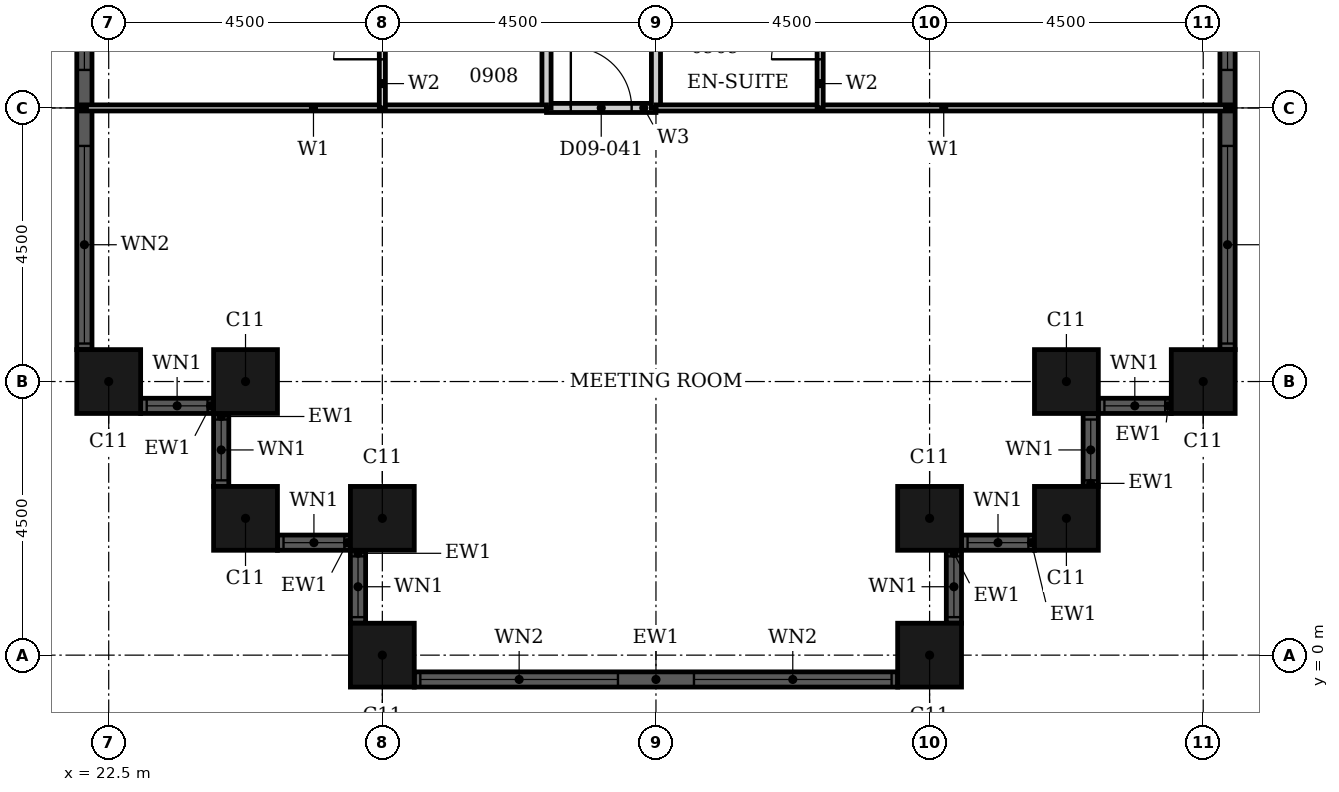
"""IFC4 building model, lengths in metres.
Left out: names, types, materials, properties, quantities, classifications, styles, units other than length and angle.
Written with IfcOpenShell. Run it as: python <this file> out.ifc"""

import sys

from ifc_helpers import new_model, si_unit, direction, frame, frame_2d, origin, origin_2d, place, context, subcontext, project, spatial, rectangle, hollow_rectangle, extrude, element, fill, save


model = new_model("IFC4")
c1 = context("Model", 3, precision=1e-05, world=origin(), true_north=direction((0.0, 1.0)))
c2 = subcontext(c1, "Body", "Model", "MODEL_VIEW")
j1 = project(units=[si_unit("LENGTHUNIT", "METRE"), si_unit("PLANEANGLEUNIT", "RADIAN")], contexts=[c1])
p1 = place(None, origin())
s1 = spatial("IfcSite", under=j1, at=p1, CompositionType="ELEMENT")
p2 = place(p1, origin())
s2 = spatial("IfcBuilding", under=s1, at=p2, CompositionType="ELEMENT")
p3 = place(p2, frame((0.0, 0.0, 44.4)))
s3 = spatial("IfcBuildingStorey", under=s2, at=p3, CompositionType="ELEMENT", Elevation=44.4)
for number, where, z_axis, x_axis in (
    (1, (22.5, 4.5, 0.0), (0.0, 0.0, 1.0), (1.0, 0.0, 0.0)),
    (2, (24.75, 4.5, 0.0), (0.0, 0.0, 1.0), (1.0, 0.0, 0.0)),
    (3, (24.75, 2.25, 0.0), (0.0, 0.0, 1.0), (1.0, 0.0, 0.0)),
    (4, (27.0, 2.25, 0.0), (0.0, 0.0, 1.0), (1.0, 0.0, 0.0)),
    (5, (27.0, 0.0, 0.0), (0.0, 0.0, 1.0), (1.0, 0.0, 0.0)),
    (6, (36.0, 0.0, 0.0), (0.0, 0.0, 1.0), (1.0, 0.0, 0.0)),
    (7, (36.0, 2.25, 0.0), (0.0, 0.0, 1.0), (1.0, 0.0, 0.0)),
    (8, (38.25, 2.25, 0.0), (0.0, 0.0, 1.0), (1.0, 0.0, 0.0)),
    (9, (38.25, 4.5, 0.0), (0.0, 0.0, 1.0), (1.0, 0.0, 0.0)),
    (10, (40.5, 4.5, 0.0), (0.0, 0.0, 1.0), (1.0, 0.0, 0.0)),
):
    element("IfcColumn", number, at=place(p3, frame(where, z_axis=z_axis, x_axis=x_axis)), inside=s3, PredefinedType="COLUMN", context=c2, shape_type="SweptSolid", body=[
        extrude(hollow_rectangle(XDim=1.05, YDim=1.05, WallThickness=0.034, at=origin_2d()), origin(), (0.0, 0.0, 1.0), 3.6),
    ])
p4 = place(p3, frame((23.025, 4.1, 0.0), z_axis=(0.0, 0.0, 1.0), x_axis=(1.0, 0.0, 0.0)))
e11 = element("IfcWall", 11, at=p4, inside=s3, PredefinedType="SOLIDWALL", context=c2, shape_type="SweptSolid", body=[
    extrude(rectangle(XDim=1.2, YDim=0.25, at=frame_2d((0.6, 0.0))), origin(), (0.0, 0.0, 1.0), 3.6),
])
p5 = place(p4, frame((0.1, 0.0, 0.9)))
e12 = element("IfcOpeningElement", 12, at=p5, cuts=e11, PredefinedType="OPENING", context=c2, shape_type="SweptSolid", body=[
    extrude(rectangle(XDim=1.0, YDim=2.08, at=frame_2d((0.5, 1.04))), frame((0.0, 0.135, 0.0), z_axis=(0.0, -1.0, 0.0), x_axis=(1.0, 0.0, 0.0)), (0.0, 0.0, 1.0), 0.27),
])
p6 = place(p3, frame((24.35, 3.975, 0.0), z_axis=(0.0, 0.0, 1.0), x_axis=(0.0, -1.0, 0.0)))
e13 = element("IfcWall", 13, at=p6, inside=s3, PredefinedType="SOLIDWALL", context=c2, shape_type="SweptSolid", body=[
    extrude(rectangle(XDim=1.2, YDim=0.25, at=frame_2d((0.6, 0.0))), origin(), (0.0, 0.0, 1.0), 3.6),
])
p7 = place(p6, frame((0.1, 0.0, 0.9)))
e14 = element("IfcOpeningElement", 14, at=p7, cuts=e13, PredefinedType="OPENING", context=c2, shape_type="SweptSolid", body=[
    extrude(rectangle(XDim=1.0, YDim=2.08, at=frame_2d((0.5, 1.04))), frame((0.0, 0.135, 0.0), z_axis=(0.0, -1.0, 0.0), x_axis=(1.0, 0.0, 0.0)), (0.0, 0.0, 1.0), 0.27),
])
p8 = place(p3, frame((25.275, 1.85, 0.0), z_axis=(0.0, 0.0, 1.0), x_axis=(1.0, 0.0, 0.0)))
e15 = element("IfcWall", 15, at=p8, inside=s3, PredefinedType="SOLIDWALL", context=c2, shape_type="SweptSolid", body=[
    extrude(rectangle(XDim=1.2, YDim=0.25, at=frame_2d((0.6, 0.0))), origin(), (0.0, 0.0, 1.0), 3.6),
])
p9 = place(p8, frame((0.1, 0.0, 0.9)))
e16 = element("IfcOpeningElement", 16, at=p9, cuts=e15, PredefinedType="OPENING", context=c2, shape_type="SweptSolid", body=[
    extrude(rectangle(XDim=1.0, YDim=2.08, at=frame_2d((0.5, 1.04))), frame((0.0, 0.135, 0.0), z_axis=(0.0, -1.0, 0.0), x_axis=(1.0, 0.0, 0.0)), (0.0, 0.0, 1.0), 0.27),
])
p10 = place(p3, frame((26.6, 1.725, 0.0), z_axis=(0.0, 0.0, 1.0), x_axis=(0.0, -1.0, 0.0)))
e17 = element("IfcWall", 17, at=p10, inside=s3, PredefinedType="SOLIDWALL", context=c2, shape_type="SweptSolid", body=[
    extrude(rectangle(XDim=1.2, YDim=0.25, at=frame_2d((0.6, 0.0))), origin(), (0.0, 0.0, 1.0), 3.6),
])
p11 = place(p10, frame((0.1, 0.0, 0.9)))
e18 = element("IfcOpeningElement", 18, at=p11, cuts=e17, PredefinedType="OPENING", context=c2, shape_type="SweptSolid", body=[
    extrude(rectangle(XDim=1.0, YDim=2.08, at=frame_2d((0.5, 1.04))), frame((0.0, 0.135, 0.0), z_axis=(0.0, -1.0, 0.0), x_axis=(1.0, 0.0, 0.0)), (0.0, 0.0, 1.0), 0.27),
])
p12 = place(p3, frame((27.525, -0.4, 0.0), z_axis=(0.0, 0.0, 1.0), x_axis=(1.0, 0.0, 0.0)))
e19 = element("IfcWall", 19, at=p12, inside=s3, PredefinedType="SOLIDWALL", context=c2, shape_type="SweptSolid", body=[
    extrude(rectangle(XDim=7.95, YDim=0.25, at=frame_2d((3.975, 0.0))), origin(), (0.0, 0.0, 1.0), 3.6),
])
p13 = place(p12, frame((0.1, 0.0, 0.9)))
e20 = element("IfcOpeningElement", 20, at=p13, cuts=e19, PredefinedType="OPENING", context=c2, shape_type="SweptSolid", body=[
    extrude(rectangle(XDim=3.25, YDim=2.08, at=frame_2d((1.625, 1.04))), frame((0.0, 0.135, 0.0), z_axis=(0.0, -1.0, 0.0), x_axis=(1.0, 0.0, 0.0)), (0.0, 0.0, 1.0), 0.27),
])
p14 = place(p12, frame((4.6, 0.0, 0.9)))
e21 = element("IfcOpeningElement", 21, at=p14, cuts=e19, PredefinedType="OPENING", context=c2, shape_type="SweptSolid", body=[
    extrude(rectangle(XDim=3.25, YDim=2.08, at=frame_2d((1.625, 1.04))), frame((0.0, 0.135, 0.0), z_axis=(0.0, -1.0, 0.0), x_axis=(1.0, 0.0, 0.0)), (0.0, 0.0, 1.0), 0.27),
])
p15 = place(p3, frame((36.4, 0.525, 0.0), z_axis=(0.0, 0.0, 1.0), x_axis=(0.0, 1.0, 0.0)))
e22 = element("IfcWall", 22, at=p15, inside=s3, PredefinedType="SOLIDWALL", context=c2, shape_type="SweptSolid", body=[
    extrude(rectangle(XDim=1.2, YDim=0.25, at=frame_2d((0.6, 0.0))), origin(), (0.0, 0.0, 1.0), 3.6),
])
p16 = place(p15, frame((0.1, 0.0, 0.9)))
e23 = element("IfcOpeningElement", 23, at=p16, cuts=e22, PredefinedType="OPENING", context=c2, shape_type="SweptSolid", body=[
    extrude(rectangle(XDim=1.0, YDim=2.08, at=frame_2d((0.5, 1.04))), frame((0.0, 0.135, 0.0), z_axis=(0.0, -1.0, 0.0), x_axis=(1.0, 0.0, 0.0)), (0.0, 0.0, 1.0), 0.27),
])
p17 = place(p3, frame((36.525, 1.85, 0.0), z_axis=(0.0, 0.0, 1.0), x_axis=(1.0, 0.0, 0.0)))
e24 = element("IfcWall", 24, at=p17, inside=s3, PredefinedType="SOLIDWALL", context=c2, shape_type="SweptSolid", body=[
    extrude(rectangle(XDim=1.2, YDim=0.25, at=frame_2d((0.6, 0.0))), origin(), (0.0, 0.0, 1.0), 3.6),
])
p18 = place(p17, frame((0.1, 0.0, 0.9)))
e25 = element("IfcOpeningElement", 25, at=p18, cuts=e24, PredefinedType="OPENING", context=c2, shape_type="SweptSolid", body=[
    extrude(rectangle(XDim=1.0, YDim=2.08, at=frame_2d((0.5, 1.04))), frame((0.0, 0.135, 0.0), z_axis=(0.0, -1.0, 0.0), x_axis=(1.0, 0.0, 0.0)), (0.0, 0.0, 1.0), 0.27),
])
p19 = place(p3, frame((38.65, 2.775, 0.0), z_axis=(0.0, 0.0, 1.0), x_axis=(0.0, 1.0, 0.0)))
e26 = element("IfcWall", 26, at=p19, inside=s3, PredefinedType="SOLIDWALL", context=c2, shape_type="SweptSolid", body=[
    extrude(rectangle(XDim=1.2, YDim=0.25, at=frame_2d((0.6, 0.0))), origin(), (0.0, 0.0, 1.0), 3.6),
])
p20 = place(p19, frame((0.1, 0.0, 0.9)))
e27 = element("IfcOpeningElement", 27, at=p20, cuts=e26, PredefinedType="OPENING", context=c2, shape_type="SweptSolid", body=[
    extrude(rectangle(XDim=1.0, YDim=2.08, at=frame_2d((0.5, 1.04))), frame((0.0, 0.135, 0.0), z_axis=(0.0, -1.0, 0.0), x_axis=(1.0, 0.0, 0.0)), (0.0, 0.0, 1.0), 0.27),
])
p21 = place(p3, frame((38.775, 4.1, 0.0), z_axis=(0.0, 0.0, 1.0), x_axis=(1.0, 0.0, 0.0)))
e28 = element("IfcWall", 28, at=p21, inside=s3, PredefinedType="SOLIDWALL", context=c2, shape_type="SweptSolid", body=[
    extrude(rectangle(XDim=1.2, YDim=0.25, at=frame_2d((0.6, 0.0))), origin(), (0.0, 0.0, 1.0), 3.6),
])
p22 = place(p21, frame((0.1, 0.0, 0.9)))
e29 = element("IfcOpeningElement", 29, at=p22, cuts=e28, PredefinedType="OPENING", context=c2, shape_type="SweptSolid", body=[
    extrude(rectangle(XDim=1.0, YDim=2.08, at=frame_2d((0.5, 1.04))), frame((0.0, 0.135, 0.0), z_axis=(0.0, -1.0, 0.0), x_axis=(1.0, 0.0, 0.0)), (0.0, 0.0, 1.0), 0.27),
])
p23 = place(p3, frame((40.9, 5.025, 0.0), z_axis=(0.0, 0.0, 1.0), x_axis=(0.0, 1.0, 0.0)))
e30 = element("IfcWall", 30, at=p23, inside=s3, PredefinedType="SOLIDWALL", context=c2, shape_type="SweptSolid", body=[
    extrude(rectangle(XDim=7.95, YDim=0.25, at=frame_2d((3.975, 0.0))), origin(), (0.0, 0.0, 1.0), 3.6),
])
p24 = place(p23, frame((0.1, 0.0, 0.9)))
e31 = element("IfcOpeningElement", 31, at=p24, cuts=e30, PredefinedType="OPENING", context=c2, shape_type="SweptSolid", body=[
    extrude(rectangle(XDim=3.25, YDim=2.08, at=frame_2d((1.625, 1.04))), frame((0.0, 0.135, 0.0), z_axis=(0.0, -1.0, 0.0), x_axis=(1.0, 0.0, 0.0)), (0.0, 0.0, 1.0), 0.27),
])
p25 = place(p23, frame((4.6, 0.0, 0.9)))
e32 = element("IfcOpeningElement", 32, at=p25, cuts=e30, PredefinedType="OPENING", context=c2, shape_type="SweptSolid", body=[
    extrude(rectangle(XDim=3.25, YDim=2.08, at=frame_2d((1.625, 1.04))), frame((0.0, 0.135, 0.0), z_axis=(0.0, -1.0, 0.0), x_axis=(1.0, 0.0, 0.0)), (0.0, 0.0, 1.0), 0.27),
])
p26 = place(p3, frame((22.1, 12.975, 0.0), z_axis=(0.0, 0.0, 1.0), x_axis=(0.0, -1.0, 0.0)))
e33 = element("IfcWall", 33, at=p26, inside=s3, PredefinedType="SOLIDWALL", context=c2, shape_type="SweptSolid", body=[
    extrude(rectangle(XDim=7.95, YDim=0.25, at=frame_2d((3.975, 0.0))), origin(), (0.0, 0.0, 1.0), 3.6),
])
p27 = place(p26, frame((0.1, 0.0, 0.9)))
e34 = element("IfcOpeningElement", 34, at=p27, cuts=e33, PredefinedType="OPENING", context=c2, shape_type="SweptSolid", body=[
    extrude(rectangle(XDim=3.25, YDim=2.08, at=frame_2d((1.625, 1.04))), frame((0.0, 0.135, 0.0), z_axis=(0.0, -1.0, 0.0), x_axis=(1.0, 0.0, 0.0)), (0.0, 0.0, 1.0), 0.27),
])
p28 = place(p26, frame((4.6, 0.0, 0.9)))
e35 = element("IfcOpeningElement", 35, at=p28, cuts=e33, PredefinedType="OPENING", context=c2, shape_type="SweptSolid", body=[
    extrude(rectangle(XDim=3.25, YDim=2.08, at=frame_2d((1.625, 1.04))), frame((0.0, 0.135, 0.0), z_axis=(0.0, -1.0, 0.0), x_axis=(1.0, 0.0, 0.0)), (0.0, 0.0, 1.0), 0.27),
])
p29 = place(p3, frame((29.7, 9.0, 0.0), z_axis=(0.0, 0.0, 1.0), x_axis=(1.0, 0.0, 0.0)))
e36 = element("IfcWall", 36, at=p29, inside=s3, PredefinedType="PARTITIONING", context=c2, shape_type="SweptSolid", body=[
    extrude(rectangle(XDim=1.8, YDim=0.15, at=frame_2d((0.9, 0.0))), origin(), (0.0, 0.0, 1.0), 3.2),
])
p30 = place(p29, frame((0.4, 0.0, 0.0)))
e37 = element("IfcOpeningElement", 37, at=p30, cuts=e36, PredefinedType="OPENING", context=c2, shape_type="SweptSolid", body=[
    extrude(rectangle(XDim=1.0, YDim=2.1, at=frame_2d((0.5, 1.05))), frame((0.0, 0.085, 0.0), z_axis=(0.0, -1.0, 0.0), x_axis=(1.0, 0.0, 0.0)), (0.0, 0.0, 1.0), 0.17),
])
p31 = place(p3, frame((29.7, 9.0, 0.0), z_axis=(0.0, 0.0, 1.0), x_axis=(0.0, 1.0, 0.0)))
e38 = element("IfcWall", 38, at=p31, inside=s3, PredefinedType="PARTITIONING", context=c2, shape_type="SweptSolid", body=[
    extrude(rectangle(XDim=4.5, YDim=0.15, at=frame_2d((2.25, 0.0))), origin(), (0.0, 0.0, 1.0), 3.2),
])
p32 = place(p31, frame((2.95, 0.0, 0.0)))
e39 = element("IfcOpeningElement", 39, at=p32, cuts=e38, PredefinedType="OPENING", context=c2, shape_type="SweptSolid", body=[
    extrude(rectangle(XDim=1.0, YDim=2.1, at=frame_2d((0.5, 1.05))), frame((0.0, 0.085, 0.0), z_axis=(0.0, -1.0, 0.0), x_axis=(1.0, 0.0, 0.0)), (0.0, 0.0, 1.0), 0.17),
])
p33 = place(p3, frame((31.5, 9.0, 0.0), z_axis=(0.0, 0.0, 1.0), x_axis=(0.0, 1.0, 0.0)))
e40 = element("IfcWall", 40, at=p33, inside=s3, PredefinedType="PARTITIONING", context=c2, shape_type="SweptSolid", body=[
    extrude(rectangle(XDim=11.7, YDim=0.15, at=frame_2d((5.85, 0.0))), origin(), (0.0, 0.0, 1.0), 2.48),
])
p34 = place(p33, frame((2.95, 0.0, 0.0)))
e41 = element("IfcOpeningElement", 41, at=p34, cuts=e40, PredefinedType="OPENING", context=c2, shape_type="SweptSolid", body=[
    extrude(rectangle(XDim=1.0, YDim=2.1, at=frame_2d((0.5, 1.05))), frame((0.0, 0.085, 0.0), z_axis=(0.0, -1.0, 0.0), x_axis=(1.0, 0.0, 0.0)), (0.0, 0.0, 1.0), 0.17),
])
p35 = place(p3, frame((31.5, 9.0, 0.0), z_axis=(0.0, 0.0, 1.0), x_axis=(1.0, 0.0, 0.0)))
e42 = element("IfcWall", 42, at=p35, inside=s3, PredefinedType="PARTITIONING", context=c2, shape_type="SweptSolid", body=[
    extrude(rectangle(XDim=9.465, YDim=0.1, at=frame_2d((4.732, 0.0))), origin(), (0.0, 0.0, 1.0), 3.2),
])
p36 = place(p3, frame((22.035, 9.0, 0.0), z_axis=(0.0, 0.0, 1.0), x_axis=(1.0, 0.0, 0.0)))
e43 = element("IfcWall", 43, at=p36, inside=s3, PredefinedType="PARTITIONING", context=c2, shape_type="SweptSolid", body=[
    extrude(rectangle(XDim=7.665, YDim=0.1, at=frame_2d((3.833, 0.0))), origin(), (0.0, 0.0, 1.0), 3.2),
])
p37 = place(p3, frame((27.0, 9.0, 0.0), z_axis=(0.0, 0.0, 1.0), x_axis=(0.0, 1.0, 0.0)))
e44 = element("IfcWall", 44, at=p37, inside=s3, PredefinedType="PARTITIONING", context=c2, shape_type="SweptSolid", body=[
    extrude(rectangle(XDim=2.4, YDim=0.1, at=frame_2d((1.2, 0.0))), origin(), (0.0, 0.0, 1.0), 2.48),
])
p38 = place(p37, frame((0.8, 0.0, 0.0)))
e45 = element("IfcOpeningElement", 45, at=p38, cuts=e44, PredefinedType="OPENING", context=c2, shape_type="SweptSolid", body=[
    extrude(rectangle(XDim=0.8, YDim=2.1, at=frame_2d((0.4, 1.05))), frame((0.0, 0.06, 0.0), z_axis=(0.0, -1.0, 0.0), x_axis=(1.0, 0.0, 0.0)), (0.0, 0.0, 1.0), 0.12),
])
p39 = place(p3, frame((34.2, 9.0, 0.0), z_axis=(0.0, 0.0, 1.0), x_axis=(0.0, 1.0, 0.0)))
e46 = element("IfcWall", 46, at=p39, inside=s3, PredefinedType="PARTITIONING", context=c2, shape_type="SweptSolid", body=[
    extrude(rectangle(XDim=2.4, YDim=0.1, at=frame_2d((1.2, 0.0))), origin(), (0.0, 0.0, 1.0), 3.2),
])
p40 = place(p39, frame((0.8, 0.0, 0.0)))
e47 = element("IfcOpeningElement", 47, at=p40, cuts=e46, PredefinedType="OPENING", context=c2, shape_type="SweptSolid", body=[
    extrude(rectangle(XDim=0.8, YDim=2.1, at=frame_2d((0.4, 1.05))), frame((0.0, 0.06, 0.0), z_axis=(0.0, -1.0, 0.0), x_axis=(1.0, 0.0, 0.0)), (0.0, 0.0, 1.0), 0.12),
])
p41 = place(p5, origin())
e48 = element("IfcWindow", 48, at=p41, inside=s3, PartitioningType="SINGLE_PANEL", PredefinedType="WINDOW", context=c2, shape_type="SweptSolid", body=[
    extrude(rectangle(XDim=1.0, YDim=2.08, at=frame_2d((0.5, 1.04))), frame((0.0, 0.03, 0.0), z_axis=(0.0, -1.0, 0.0), x_axis=(1.0, 0.0, 0.0)), (0.0, 0.0, 1.0), 0.06),
])
fill(e12, e48)
p42 = place(p7, origin())
e49 = element("IfcWindow", 49, at=p42, inside=s3, PartitioningType="SINGLE_PANEL", PredefinedType="WINDOW", context=c2, shape_type="SweptSolid", body=[
    extrude(rectangle(XDim=1.0, YDim=2.08, at=frame_2d((0.5, 1.04))), frame((0.0, 0.03, 0.0), z_axis=(0.0, -1.0, 0.0), x_axis=(1.0, 0.0, 0.0)), (0.0, 0.0, 1.0), 0.06),
])
fill(e14, e49)
p43 = place(p9, origin())
e50 = element("IfcWindow", 50, at=p43, inside=s3, PartitioningType="SINGLE_PANEL", PredefinedType="WINDOW", context=c2, shape_type="SweptSolid", body=[
    extrude(rectangle(XDim=1.0, YDim=2.08, at=frame_2d((0.5, 1.04))), frame((0.0, 0.03, 0.0), z_axis=(0.0, -1.0, 0.0), x_axis=(1.0, 0.0, 0.0)), (0.0, 0.0, 1.0), 0.06),
])
fill(e16, e50)
p44 = place(p11, origin())
e51 = element("IfcWindow", 51, at=p44, inside=s3, PartitioningType="SINGLE_PANEL", PredefinedType="WINDOW", context=c2, shape_type="SweptSolid", body=[
    extrude(rectangle(XDim=1.0, YDim=2.08, at=frame_2d((0.5, 1.04))), frame((0.0, 0.03, 0.0), z_axis=(0.0, -1.0, 0.0), x_axis=(1.0, 0.0, 0.0)), (0.0, 0.0, 1.0), 0.06),
])
fill(e18, e51)
p45 = place(p13, origin())
e52 = element("IfcWindow", 52, at=p45, inside=s3, PartitioningType="SINGLE_PANEL", PredefinedType="WINDOW", context=c2, shape_type="SweptSolid", body=[
    extrude(rectangle(XDim=3.25, YDim=2.08, at=frame_2d((1.625, 1.04))), frame((0.0, 0.03, 0.0), z_axis=(0.0, -1.0, 0.0), x_axis=(1.0, 0.0, 0.0)), (0.0, 0.0, 1.0), 0.06),
])
fill(e20, e52)
p46 = place(p14, origin())
e53 = element("IfcWindow", 53, at=p46, inside=s3, PartitioningType="SINGLE_PANEL", PredefinedType="WINDOW", context=c2, shape_type="SweptSolid", body=[
    extrude(rectangle(XDim=3.25, YDim=2.08, at=frame_2d((1.625, 1.04))), frame((0.0, 0.03, 0.0), z_axis=(0.0, -1.0, 0.0), x_axis=(1.0, 0.0, 0.0)), (0.0, 0.0, 1.0), 0.06),
])
fill(e21, e53)
p47 = place(p16, origin())
e54 = element("IfcWindow", 54, at=p47, inside=s3, PartitioningType="SINGLE_PANEL", PredefinedType="WINDOW", context=c2, shape_type="SweptSolid", body=[
    extrude(rectangle(XDim=1.0, YDim=2.08, at=frame_2d((0.5, 1.04))), frame((0.0, 0.03, 0.0), z_axis=(0.0, -1.0, 0.0), x_axis=(1.0, 0.0, 0.0)), (0.0, 0.0, 1.0), 0.06),
])
fill(e23, e54)
p48 = place(p18, origin())
e55 = element("IfcWindow", 55, at=p48, inside=s3, PartitioningType="SINGLE_PANEL", PredefinedType="WINDOW", context=c2, shape_type="SweptSolid", body=[
    extrude(rectangle(XDim=1.0, YDim=2.08, at=frame_2d((0.5, 1.04))), frame((0.0, 0.03, 0.0), z_axis=(0.0, -1.0, 0.0), x_axis=(1.0, 0.0, 0.0)), (0.0, 0.0, 1.0), 0.06),
])
fill(e25, e55)
p49 = place(p20, origin())
e56 = element("IfcWindow", 56, at=p49, inside=s3, PartitioningType="SINGLE_PANEL", PredefinedType="WINDOW", context=c2, shape_type="SweptSolid", body=[
    extrude(rectangle(XDim=1.0, YDim=2.08, at=frame_2d((0.5, 1.04))), frame((0.0, 0.03, 0.0), z_axis=(0.0, -1.0, 0.0), x_axis=(1.0, 0.0, 0.0)), (0.0, 0.0, 1.0), 0.06),
])
fill(e27, e56)
p50 = place(p22, origin())
e57 = element("IfcWindow", 57, at=p50, inside=s3, PartitioningType="SINGLE_PANEL", PredefinedType="WINDOW", context=c2, shape_type="SweptSolid", body=[
    extrude(rectangle(XDim=1.0, YDim=2.08, at=frame_2d((0.5, 1.04))), frame((0.0, 0.03, 0.0), z_axis=(0.0, -1.0, 0.0), x_axis=(1.0, 0.0, 0.0)), (0.0, 0.0, 1.0), 0.06),
])
fill(e29, e57)
p51 = place(p24, origin())
e58 = element("IfcWindow", 58, at=p51, inside=s3, PartitioningType="SINGLE_PANEL", PredefinedType="WINDOW", context=c2, shape_type="SweptSolid", body=[
    extrude(rectangle(XDim=3.25, YDim=2.08, at=frame_2d((1.625, 1.04))), frame((0.0, 0.03, 0.0), z_axis=(0.0, -1.0, 0.0), x_axis=(1.0, 0.0, 0.0)), (0.0, 0.0, 1.0), 0.06),
])
fill(e31, e58)
p52 = place(p25, origin())
e59 = element("IfcWindow", 59, at=p52, inside=s3, PartitioningType="SINGLE_PANEL", PredefinedType="WINDOW", context=c2, shape_type="SweptSolid", body=[
    extrude(rectangle(XDim=3.25, YDim=2.08, at=frame_2d((1.625, 1.04))), frame((0.0, 0.03, 0.0), z_axis=(0.0, -1.0, 0.0), x_axis=(1.0, 0.0, 0.0)), (0.0, 0.0, 1.0), 0.06),
])
fill(e32, e59)
p53 = place(p27, origin())
e60 = element("IfcWindow", 60, at=p53, inside=s3, PartitioningType="SINGLE_PANEL", PredefinedType="WINDOW", context=c2, shape_type="SweptSolid", body=[
    extrude(rectangle(XDim=3.25, YDim=2.08, at=frame_2d((1.625, 1.04))), frame((0.0, 0.03, 0.0), z_axis=(0.0, -1.0, 0.0), x_axis=(1.0, 0.0, 0.0)), (0.0, 0.0, 1.0), 0.06),
])
fill(e34, e60)
p54 = place(p28, origin())
e61 = element("IfcWindow", 61, at=p54, inside=s3, PartitioningType="SINGLE_PANEL", PredefinedType="WINDOW", context=c2, shape_type="SweptSolid", body=[
    extrude(rectangle(XDim=3.25, YDim=2.08, at=frame_2d((1.625, 1.04))), frame((0.0, 0.03, 0.0), z_axis=(0.0, -1.0, 0.0), x_axis=(1.0, 0.0, 0.0)), (0.0, 0.0, 1.0), 0.06),
])
fill(e35, e61)
p55 = place(p38, origin())
e62 = element("IfcDoor", 62, at=p55, inside=s3, OperationType="SINGLE_SWING_RIGHT", PredefinedType="DOOR", context=c2, shape_type="SweptSolid", body=[
    extrude(rectangle(XDim=0.8, YDim=2.1, at=frame_2d((0.4, 1.05))), frame((0.0, 0.025, 0.0), z_axis=(0.0, -1.0, 0.0), x_axis=(1.0, 0.0, 0.0)), (0.0, 0.0, 1.0), 0.05),
])
fill(e45, e62)
p56 = place(p40, origin())
e63 = element("IfcDoor", 63, at=p56, inside=s3, OperationType="SINGLE_SWING_RIGHT", PredefinedType="DOOR", context=c2, shape_type="SweptSolid", body=[
    extrude(rectangle(XDim=0.8, YDim=2.1, at=frame_2d((0.4, 1.05))), frame((0.0, 0.025, 0.0), z_axis=(0.0, -1.0, 0.0), x_axis=(1.0, 0.0, 0.0)), (0.0, 0.0, 1.0), 0.05),
])
fill(e47, e63)
p57 = place(p30, origin())
e64 = element("IfcDoor", 64, at=p57, inside=s3, OperationType="SINGLE_SWING_LEFT", PredefinedType="DOOR", context=c2, shape_type="SweptSolid", body=[
    extrude(rectangle(XDim=1.0, YDim=2.1, at=frame_2d((0.5, 1.05))), frame((0.0, 0.025, 0.0), z_axis=(0.0, -1.0, 0.0), x_axis=(1.0, 0.0, 0.0)), (0.0, 0.0, 1.0), 0.05),
])
fill(e37, e64)
save(model, sys.argv[1])
